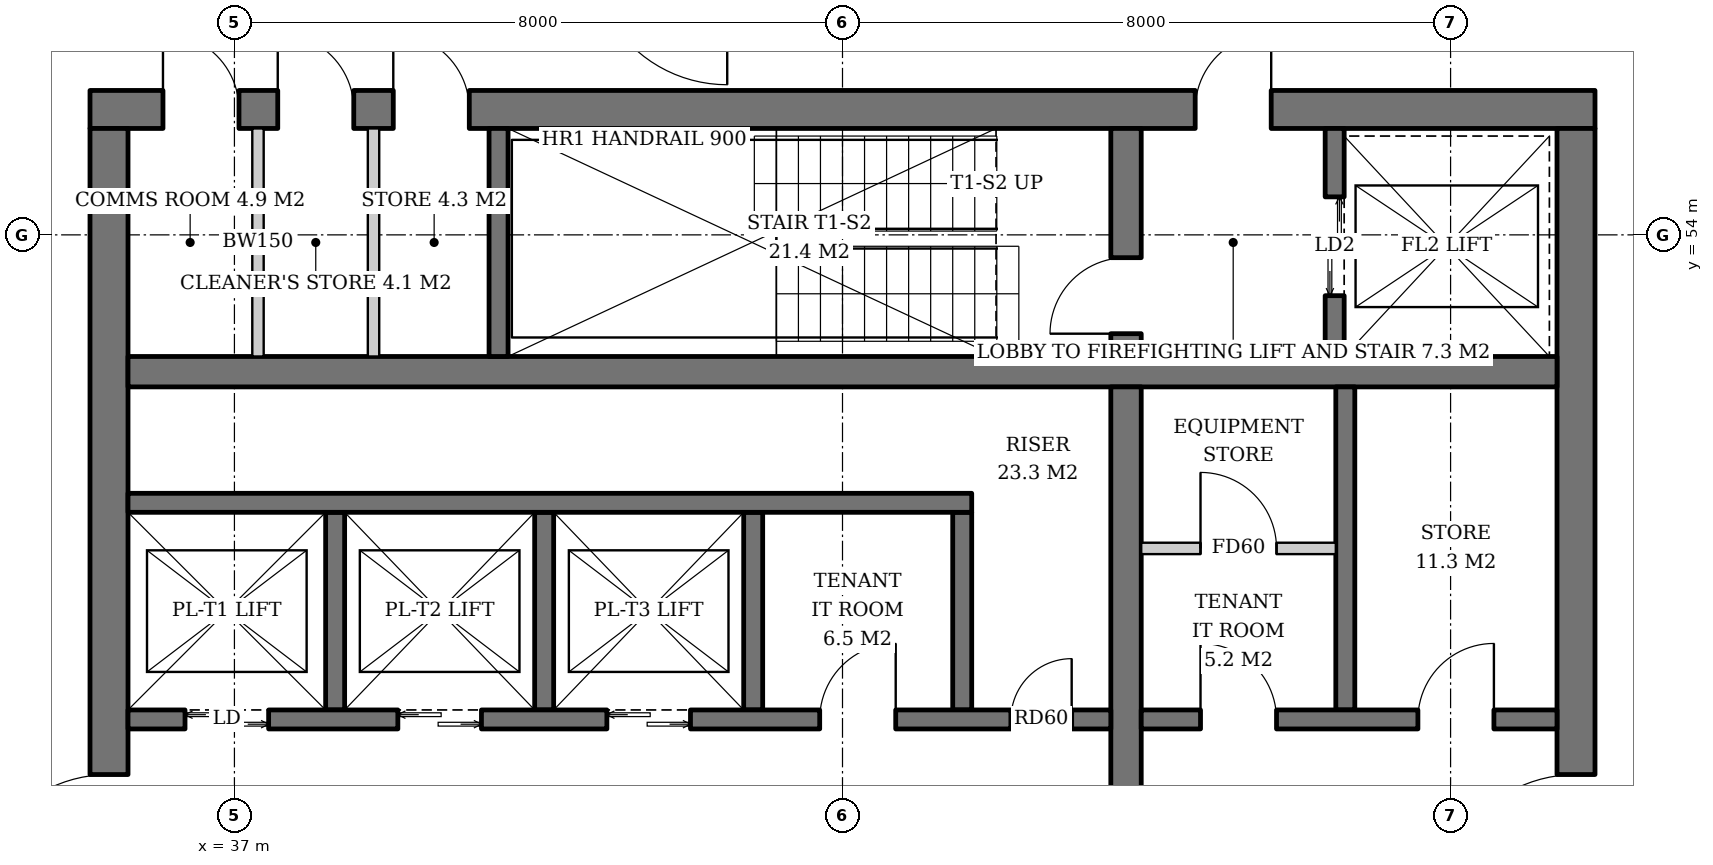
"""IFC4 building model, lengths in metres.
Left out: names, types, materials, properties, quantities, classifications, styles, units other than length and angle.
Written with IfcOpenShell. Run it as: python <this file> out.ifc"""

import sys

from ifc_helpers import new_model, si_unit, direction, frame, frame_2d, origin, place, context, subcontext, project, spatial, rectangle, extrude, element, fill, save


model = new_model("IFC4")
c1 = context("Model", 3, precision=1e-05, world=origin(), true_north=direction((0.0, 1.0)))
c2 = subcontext(c1, "Body", "Model", "MODEL_VIEW")
j1 = project(units=[si_unit("LENGTHUNIT", "METRE"), si_unit("PLANEANGLEUNIT", "RADIAN")], contexts=[c1])
p1 = place(None, origin())
s1 = spatial("IfcSite", under=j1, at=p1, CompositionType="ELEMENT")
p2 = place(p1, origin())
s2 = spatial("IfcBuilding", under=s1, at=p2, CompositionType="ELEMENT")
p3 = place(p2, frame((0.0, 0.0, 256.6)))
s3 = spatial("IfcBuildingStorey", under=s2, at=p3, CompositionType="ELEMENT", Elevation=256.6)
p4 = place(p3, frame((35.1, 55.65, 0.0), z_axis=(0.0, 0.0, 1.0), x_axis=(1.0, 0.0, 0.0)))
e1 = element("IfcWall", 1, at=p4, inside=s3, PredefinedType="SHEAR", context=c2, shape_type="SweptSolid", body=[
    extrude(rectangle(XDim=19.8, YDim=0.5, at=frame_2d((9.9, 0.0))), origin(), (0.0, 0.0, 1.0), 3.8),
])
p5 = place(p4, frame((14.54, 0.0, 0.0)))
e2 = element("IfcOpeningElement", 2, at=p5, cuts=e1, PredefinedType="OPENING", context=c2, shape_type="SweptSolid", body=[
    extrude(rectangle(XDim=1.0, YDim=2.1, at=frame_2d((0.5, 1.05))), frame((0.0, 0.26, 0.0), z_axis=(0.0, -1.0, 0.0), x_axis=(1.0, 0.0, 0.0)), (0.0, 0.0, 1.0), 0.52),
])
p6 = place(p4, frame((0.96, 0.0, 0.0)))
e3 = element("IfcOpeningElement", 3, at=p6, cuts=e1, PredefinedType="OPENING", context=c2, shape_type="SweptSolid", body=[
    extrude(rectangle(XDim=1.0, YDim=2.1, at=frame_2d((0.5, 1.05))), frame((0.0, 0.26, 0.0), z_axis=(0.0, -1.0, 0.0), x_axis=(1.0, 0.0, 0.0)), (0.0, 0.0, 1.0), 0.52),
])
p7 = place(p4, frame((2.47, 0.0, 0.0)))
e4 = element("IfcOpeningElement", 4, at=p7, cuts=e1, PredefinedType="OPENING", context=c2, shape_type="SweptSolid", body=[
    extrude(rectangle(XDim=1.0, YDim=2.1, at=frame_2d((0.5, 1.05))), frame((0.0, 0.26, 0.0), z_axis=(0.0, -1.0, 0.0), x_axis=(1.0, 0.0, 0.0)), (0.0, 0.0, 1.0), 0.52),
])
p8 = place(p4, frame((3.99, 0.0, 0.0)))
e5 = element("IfcOpeningElement", 5, at=p8, cuts=e1, PredefinedType="OPENING", context=c2, shape_type="SweptSolid", body=[
    extrude(rectangle(XDim=1.0, YDim=2.1, at=frame_2d((0.5, 1.05))), frame((0.0, 0.26, 0.0), z_axis=(0.0, -1.0, 0.0), x_axis=(1.0, 0.0, 0.0)), (0.0, 0.0, 1.0), 0.52),
])
p9 = place(p3, frame((35.35, 36.6, 0.0), z_axis=(0.0, 0.0, 1.0), x_axis=(0.0, 1.0, 0.0)))
e6 = element("IfcWall", 6, at=p9, inside=s3, PredefinedType="SHEAR", context=c2, shape_type="SweptSolid", body=[
    extrude(rectangle(XDim=18.8, YDim=0.5, at=frame_2d((9.4, 0.0))), origin(), (0.0, 0.0, 1.0), 3.8),
])
p10 = place(p9, frame((8.5, 0.0, 0.0)))
e7 = element("IfcOpeningElement", 7, at=p10, cuts=e6, PredefinedType="OPENING", context=c2, shape_type="SweptSolid", body=[
    extrude(rectangle(XDim=1.8, YDim=2.4, at=frame_2d((0.9, 1.2))), frame((0.0, 0.26, 0.0), z_axis=(0.0, -1.0, 0.0), x_axis=(1.0, 0.0, 0.0)), (0.0, 0.0, 1.0), 0.52),
])
p11 = place(p3, frame((54.65, 36.6, 0.0), z_axis=(0.0, 0.0, 1.0), x_axis=(0.0, 1.0, 0.0)))
e8 = element("IfcWall", 8, at=p11, inside=s3, PredefinedType="SHEAR", context=c2, shape_type="SweptSolid", body=[
    extrude(rectangle(XDim=18.8, YDim=0.5, at=frame_2d((9.4, 0.0))), origin(), (0.0, 0.0, 1.0), 3.8),
])
p12 = place(p11, frame((8.5, 0.0, 0.0)))
e9 = element("IfcOpeningElement", 9, at=p12, cuts=e8, PredefinedType="OPENING", context=c2, shape_type="SweptSolid", body=[
    extrude(rectangle(XDim=1.8, YDim=2.4, at=frame_2d((0.9, 1.2))), frame((0.0, 0.26, 0.0), z_axis=(0.0, -1.0, 0.0), x_axis=(1.0, 0.0, 0.0)), (0.0, 0.0, 1.0), 0.52),
])
p13 = place(p3, frame((35.6, 52.2, 0.0), z_axis=(0.0, 0.0, 1.0), x_axis=(1.0, 0.0, 0.0)))
e10 = element("IfcWall", 10, at=p13, inside=s3, PredefinedType="SHEAR", context=c2, shape_type="SweptSolid", body=[
    extrude(rectangle(XDim=18.8, YDim=0.4, at=frame_2d((9.4, 0.0))), origin(), (0.0, 0.0, 1.0), 3.8),
])
p14 = place(p3, frame((48.73, 40.0, 0.0), z_axis=(0.0, 0.0, 1.0), x_axis=(0.0, 1.0, 0.0)))
e11 = element("IfcWall", 11, at=p14, inside=s3, PredefinedType="SHEAR", context=c2, shape_type="SweptSolid", body=[
    extrude(rectangle(XDim=12.0, YDim=0.4, at=frame_2d((6.0, 0.0))), origin(), (0.0, 0.0, 1.0), 3.8),
])
p15 = place(p3, frame((48.73, 52.4, 0.0), z_axis=(0.0, 0.0, 1.0), x_axis=(0.0, 1.0, 0.0)))
e12 = element("IfcWall", 12, at=p15, inside=s3, PredefinedType="SHEAR", context=c2, shape_type="SweptSolid", body=[
    extrude(rectangle(XDim=3.0, YDim=0.4, at=frame_2d((1.5, 0.0))), origin(), (0.0, 0.0, 1.0), 3.8),
])
p16 = place(p15, frame((0.3, 0.0, 0.0)))
e13 = element("IfcOpeningElement", 13, at=p16, cuts=e12, PredefinedType="OPENING", context=c2, shape_type="SweptSolid", body=[
    extrude(rectangle(XDim=1.0, YDim=2.1, at=frame_2d((0.5, 1.05))), frame((0.0, 0.21, 0.0), z_axis=(0.0, -1.0, 0.0), x_axis=(1.0, 0.0, 0.0)), (0.0, 0.0, 1.0), 0.42),
])
p17 = place(p3, frame((40.475, 52.4, 0.0), z_axis=(0.0, 0.0, 1.0), x_axis=(0.0, 1.0, 0.0)))
e14 = element("IfcWall", 14, at=p17, inside=s3, PredefinedType="SHEAR", context=c2, shape_type="SweptSolid", body=[
    extrude(rectangle(XDim=3.0, YDim=0.25, at=frame_2d((1.5, 0.0))), origin(), (0.0, 0.0, 1.0), 3.8),
])
p18 = place(p3, frame((51.475, 52.4, 0.0), z_axis=(0.0, 0.0, 1.0), x_axis=(0.0, 1.0, 0.0)))
e15 = element("IfcWall", 15, at=p18, inside=s3, PredefinedType="SHEAR", context=c2, shape_type="SweptSolid", body=[
    extrude(rectangle(XDim=3.0, YDim=0.25, at=frame_2d((1.5, 0.0))), origin(), (0.0, 0.0, 1.0), 3.8),
])
p19 = place(p18, frame((0.8, 0.0, 0.0)))
e16 = element("IfcOpeningElement", 16, at=p19, cuts=e15, PredefinedType="OPENING", context=c2, shape_type="SweptSolid", body=[
    extrude(rectangle(XDim=1.3, YDim=2.2, at=frame_2d((0.65, 1.1))), frame((0.0, 0.135, 0.0), z_axis=(0.0, -1.0, 0.0), x_axis=(1.0, 0.0, 0.0)), (0.0, 0.0, 1.0), 0.27),
])
for number, where, z_axis, x_axis in (
    (17, (38.325, 47.75, 0.0), (0.0, 0.0, 1.0), (0.0, 1.0, 0.0)),
    (18, (41.075, 47.75, 0.0), (0.0, 0.0, 1.0), (0.0, 1.0, 0.0)),
    (19, (43.825, 47.75, 0.0), (0.0, 0.0, 1.0), (0.0, 1.0, 0.0)),
    (20, (46.575, 47.75, 0.0), (0.0, 0.0, 1.0), (0.0, 1.0, 0.0)),
):
    element("IfcWall", number, at=place(p3, frame(where, z_axis=z_axis, x_axis=x_axis)), inside=s3, PredefinedType="SHEAR", context=c2, shape_type="SweptSolid", body=[
        extrude(rectangle(XDim=2.6, YDim=0.25, at=frame_2d((1.3, 0.0))), origin(), (0.0, 0.0, 1.0), 3.8),
    ])
p20 = place(p3, frame((35.6, 50.475, 0.0), z_axis=(0.0, 0.0, 1.0), x_axis=(1.0, 0.0, 0.0)))
e21 = element("IfcWall", 21, at=p20, inside=s3, PredefinedType="SHEAR", context=c2, shape_type="SweptSolid", body=[
    extrude(rectangle(XDim=11.1, YDim=0.25, at=frame_2d((5.55, 0.0))), origin(), (0.0, 0.0, 1.0), 3.8),
])
p21 = place(p3, frame((35.6, 47.625, 0.0), z_axis=(0.0, 0.0, 1.0), x_axis=(1.0, 0.0, 0.0)))
e22 = element("IfcWall", 22, at=p21, inside=s3, PredefinedType="SHEAR", context=c2, shape_type="SweptSolid", body=[
    extrude(rectangle(XDim=12.93, YDim=0.25, at=frame_2d((6.465, 0.0))), origin(), (0.0, 0.0, 1.0), 3.8),
])
p22 = place(p21, frame((0.75, 0.0, 0.0)))
e23 = element("IfcOpeningElement", 23, at=p22, cuts=e22, PredefinedType="OPENING", context=c2, shape_type="SweptSolid", body=[
    extrude(rectangle(XDim=1.1, YDim=2.2, at=frame_2d((0.55, 1.1))), frame((0.0, 0.135, 0.0), z_axis=(0.0, -1.0, 0.0), x_axis=(1.0, 0.0, 0.0)), (0.0, 0.0, 1.0), 0.27),
])
p23 = place(p21, frame((3.55, 0.0, 0.0)))
e24 = element("IfcOpeningElement", 24, at=p23, cuts=e22, PredefinedType="OPENING", context=c2, shape_type="SweptSolid", body=[
    extrude(rectangle(XDim=1.1, YDim=2.2, at=frame_2d((0.55, 1.1))), frame((0.0, 0.135, 0.0), z_axis=(0.0, -1.0, 0.0), x_axis=(1.0, 0.0, 0.0)), (0.0, 0.0, 1.0), 0.27),
])
p24 = place(p21, frame((6.3, 0.0, 0.0)))
e25 = element("IfcOpeningElement", 25, at=p24, cuts=e22, PredefinedType="OPENING", context=c2, shape_type="SweptSolid", body=[
    extrude(rectangle(XDim=1.1, YDim=2.2, at=frame_2d((0.55, 1.1))), frame((0.0, 0.135, 0.0), z_axis=(0.0, -1.0, 0.0), x_axis=(1.0, 0.0, 0.0)), (0.0, 0.0, 1.0), 0.27),
])
p25 = place(p21, frame((9.1, 0.0, 0.0)))
e26 = element("IfcOpeningElement", 26, at=p25, cuts=e22, PredefinedType="OPENING", context=c2, shape_type="SweptSolid", body=[
    extrude(rectangle(XDim=1.0, YDim=2.1, at=frame_2d((0.5, 1.05))), frame((0.0, 0.135, 0.0), z_axis=(0.0, -1.0, 0.0), x_axis=(1.0, 0.0, 0.0)), (0.0, 0.0, 1.0), 0.27),
])
p26 = place(p21, frame((11.615, 0.0, 0.0)))
e27 = element("IfcOpeningElement", 27, at=p26, cuts=e22, PredefinedType="OPENING", context=c2, shape_type="SweptSolid", body=[
    extrude(rectangle(XDim=0.8, YDim=2.0, at=frame_2d((0.4, 1.0))), frame((0.0, 0.135, 0.0), z_axis=(0.0, -1.0, 0.0), x_axis=(1.0, 0.0, 0.0)), (0.0, 0.0, 1.0), 0.27),
])
p27 = place(p3, frame((51.615, 47.75, 0.0), z_axis=(0.0, 0.0, 1.0), x_axis=(0.0, 1.0, 0.0)))
e28 = element("IfcWall", 28, at=p27, inside=s3, PredefinedType="SHEAR", context=c2, shape_type="SweptSolid", body=[
    extrude(rectangle(XDim=4.25, YDim=0.25, at=frame_2d((2.125, 0.0))), origin(), (0.0, 0.0, 1.0), 3.8),
])
p28 = place(p3, frame((48.93, 47.625, 0.0), z_axis=(0.0, 0.0, 1.0), x_axis=(1.0, 0.0, 0.0)))
e29 = element("IfcWall", 29, at=p28, inside=s3, PredefinedType="SHEAR", context=c2, shape_type="SweptSolid", body=[
    extrude(rectangle(XDim=5.47, YDim=0.25, at=frame_2d((2.735, 0.0))), origin(), (0.0, 0.0, 1.0), 3.8),
])
p29 = place(p28, frame((0.78, 0.0, 0.0)))
e30 = element("IfcOpeningElement", 30, at=p29, cuts=e29, PredefinedType="OPENING", context=c2, shape_type="SweptSolid", body=[
    extrude(rectangle(XDim=1.0, YDim=2.1, at=frame_2d((0.5, 1.05))), frame((0.0, 0.135, 0.0), z_axis=(0.0, -1.0, 0.0), x_axis=(1.0, 0.0, 0.0)), (0.0, 0.0, 1.0), 0.27),
])
p30 = place(p28, frame((3.64, 0.0, 0.0)))
e31 = element("IfcOpeningElement", 31, at=p30, cuts=e29, PredefinedType="OPENING", context=c2, shape_type="SweptSolid", body=[
    extrude(rectangle(XDim=1.0, YDim=2.1, at=frame_2d((0.5, 1.05))), frame((0.0, 0.135, 0.0), z_axis=(0.0, -1.0, 0.0), x_axis=(1.0, 0.0, 0.0)), (0.0, 0.0, 1.0), 0.27),
])
for number, where, z_axis, x_axis in (
    (32, (37.31, 52.4, 0.0), (0.0, 0.0, 1.0), (0.0, 1.0, 0.0)),
    (33, (38.83, 52.4, 0.0), (0.0, 0.0, 1.0), (0.0, 1.0, 0.0)),
):
    element("IfcWall", number, at=place(p3, frame(where, z_axis=z_axis, x_axis=x_axis)), inside=s3, PredefinedType="SOLIDWALL", context=c2, shape_type="SweptSolid", body=[
        extrude(rectangle(XDim=3.0, YDim=0.15, at=frame_2d((1.5, 0.0))), origin(), (0.0, 0.0, 1.0), 3.62),
    ])
p31 = place(p3, frame((48.93, 49.875, 0.0), z_axis=(0.0, 0.0, 1.0), x_axis=(1.0, 0.0, 0.0)))
e34 = element("IfcWall", 34, at=p31, inside=s3, PredefinedType="SOLIDWALL", context=c2, shape_type="SweptSolid", body=[
    extrude(rectangle(XDim=2.56, YDim=0.15, at=frame_2d((1.28, 0.0))), origin(), (0.0, 0.0, 1.0), 3.62),
])
p32 = place(p31, frame((0.78, 0.0, 0.0)))
e35 = element("IfcOpeningElement", 35, at=p32, cuts=e34, PredefinedType="OPENING", context=c2, shape_type="SweptSolid", body=[
    extrude(rectangle(XDim=1.0, YDim=2.1, at=frame_2d((0.5, 1.05))), frame((0.0, 0.085, 0.0), z_axis=(0.0, -1.0, 0.0), x_axis=(1.0, 0.0, 0.0)), (0.0, 0.0, 1.0), 0.17),
])
p33 = place(p19, origin())
e36 = element("IfcDoor", 36, at=p33, inside=s3, OperationType="DOUBLE_DOOR_SLIDING", PredefinedType="DOOR", context=c2, shape_type="SweptSolid", body=[
    extrude(rectangle(XDim=1.3, YDim=2.2, at=frame_2d((0.65, 1.1))), frame((0.0, 0.025, 0.0), z_axis=(0.0, -1.0, 0.0), x_axis=(1.0, 0.0, 0.0)), (0.0, 0.0, 1.0), 0.05),
])
fill(e16, e36)
p34 = place(p22, origin())
e37 = element("IfcDoor", 37, at=p34, inside=s3, OperationType="DOUBLE_DOOR_SLIDING", PredefinedType="DOOR", context=c2, shape_type="SweptSolid", body=[
    extrude(rectangle(XDim=1.1, YDim=2.2, at=frame_2d((0.55, 1.1))), frame((0.0, 0.025, 0.0), z_axis=(0.0, -1.0, 0.0), x_axis=(1.0, 0.0, 0.0)), (0.0, 0.0, 1.0), 0.05),
])
fill(e23, e37)
p35 = place(p23, origin())
e38 = element("IfcDoor", 38, at=p35, inside=s3, OperationType="DOUBLE_DOOR_SLIDING", PredefinedType="DOOR", context=c2, shape_type="SweptSolid", body=[
    extrude(rectangle(XDim=1.1, YDim=2.2, at=frame_2d((0.55, 1.1))), frame((0.0, 0.025, 0.0), z_axis=(0.0, -1.0, 0.0), x_axis=(1.0, 0.0, 0.0)), (0.0, 0.0, 1.0), 0.05),
])
fill(e24, e38)
p36 = place(p24, origin())
e39 = element("IfcDoor", 39, at=p36, inside=s3, OperationType="DOUBLE_DOOR_SLIDING", PredefinedType="DOOR", context=c2, shape_type="SweptSolid", body=[
    extrude(rectangle(XDim=1.1, YDim=2.2, at=frame_2d((0.55, 1.1))), frame((0.0, 0.025, 0.0), z_axis=(0.0, -1.0, 0.0), x_axis=(1.0, 0.0, 0.0)), (0.0, 0.0, 1.0), 0.05),
])
fill(e25, e39)
p37 = place(p25, origin())
e40 = element("IfcDoor", 40, at=p37, inside=s3, OperationType="SINGLE_SWING_RIGHT", PredefinedType="DOOR", context=c2, shape_type="SweptSolid", body=[
    extrude(rectangle(XDim=1.0, YDim=2.1, at=frame_2d((0.5, 1.05))), frame((0.0, 0.025, 0.0), z_axis=(0.0, -1.0, 0.0), x_axis=(1.0, 0.0, 0.0)), (0.0, 0.0, 1.0), 0.05),
])
fill(e26, e40)
p38 = place(p26, origin())
e41 = element("IfcDoor", 41, at=p38, inside=s3, OperationType="SINGLE_SWING_RIGHT", PredefinedType="DOOR", context=c2, shape_type="SweptSolid", body=[
    extrude(rectangle(XDim=0.8, YDim=2.0, at=frame_2d((0.4, 1.0))), frame((0.0, 0.025, 0.0), z_axis=(0.0, -1.0, 0.0), x_axis=(1.0, 0.0, 0.0)), (0.0, 0.0, 1.0), 0.05),
])
fill(e27, e41)
p39 = place(p29, origin())
e42 = element("IfcDoor", 42, at=p39, inside=s3, OperationType="SINGLE_SWING_LEFT", PredefinedType="DOOR", context=c2, shape_type="SweptSolid", body=[
    extrude(rectangle(XDim=1.0, YDim=2.1, at=frame_2d((0.5, 1.05))), frame((0.0, 0.025, 0.0), z_axis=(0.0, -1.0, 0.0), x_axis=(1.0, 0.0, 0.0)), (0.0, 0.0, 1.0), 0.05),
])
fill(e30, e42)
p40 = place(p30, origin())
e43 = element("IfcDoor", 43, at=p40, inside=s3, OperationType="SINGLE_SWING_RIGHT", PredefinedType="DOOR", context=c2, shape_type="SweptSolid", body=[
    extrude(rectangle(XDim=1.0, YDim=2.1, at=frame_2d((0.5, 1.05))), frame((0.0, 0.025, 0.0), z_axis=(0.0, -1.0, 0.0), x_axis=(1.0, 0.0, 0.0)), (0.0, 0.0, 1.0), 0.05),
])
fill(e31, e43)
p41 = place(p32, origin())
e44 = element("IfcDoor", 44, at=p41, inside=s3, OperationType="SINGLE_SWING_LEFT", PredefinedType="DOOR", context=c2, shape_type="SweptSolid", body=[
    extrude(rectangle(XDim=1.0, YDim=2.1, at=frame_2d((0.5, 1.05))), frame((0.0, 0.025, 0.0), z_axis=(0.0, -1.0, 0.0), x_axis=(1.0, 0.0, 0.0)), (0.0, 0.0, 1.0), 0.05),
])
fill(e35, e44)
p42 = place(p16, origin())
e45 = element("IfcDoor", 45, at=p42, inside=s3, OperationType="SINGLE_SWING_LEFT", PredefinedType="DOOR", context=c2, shape_type="SweptSolid", body=[
    extrude(rectangle(XDim=1.0, YDim=2.1, at=frame_2d((0.5, 1.05))), frame((0.0, 0.025, 0.0), z_axis=(0.0, -1.0, 0.0), x_axis=(1.0, 0.0, 0.0)), (0.0, 0.0, 1.0), 0.05),
])
fill(e13, e45)
p43 = place(p5, origin())
e46 = element("IfcDoor", 46, at=p43, inside=s3, OperationType="SINGLE_SWING_RIGHT", PredefinedType="DOOR", context=c2, shape_type="SweptSolid", body=[
    extrude(rectangle(XDim=1.0, YDim=2.1, at=frame_2d((0.5, 1.05))), frame((0.0, 0.025, 0.0), z_axis=(0.0, -1.0, 0.0), x_axis=(1.0, 0.0, 0.0)), (0.0, 0.0, 1.0), 0.05),
])
fill(e2, e46)
p44 = place(p10, origin())
e47 = element("IfcDoor", 47, at=p44, inside=s3, OperationType="DOUBLE_DOOR_SINGLE_SWING", PredefinedType="DOOR", context=c2, shape_type="SweptSolid", body=[
    extrude(rectangle(XDim=1.8, YDim=2.4, at=frame_2d((0.9, 1.2))), frame((0.0, 0.025, 0.0), z_axis=(0.0, -1.0, 0.0), x_axis=(1.0, 0.0, 0.0)), (0.0, 0.0, 1.0), 0.05),
])
fill(e7, e47)
p45 = place(p12, origin())
e48 = element("IfcDoor", 48, at=p45, inside=s3, OperationType="DOUBLE_DOOR_SINGLE_SWING", PredefinedType="DOOR", context=c2, shape_type="SweptSolid", body=[
    extrude(rectangle(XDim=1.8, YDim=2.4, at=frame_2d((0.9, 1.2))), frame((0.0, 0.025, 0.0), z_axis=(0.0, -1.0, 0.0), x_axis=(1.0, 0.0, 0.0)), (0.0, 0.0, 1.0), 0.05),
])
fill(e9, e48)
p46 = place(p6, origin())
e49 = element("IfcDoor", 49, at=p46, inside=s3, OperationType="SINGLE_SWING_LEFT", PredefinedType="DOOR", context=c2, shape_type="SweptSolid", body=[
    extrude(rectangle(XDim=1.0, YDim=2.1, at=frame_2d((0.5, 1.05))), frame((0.0, -0.19, 0.0), z_axis=(0.0, -1.0, 0.0), x_axis=(1.0, 0.0, 0.0)), (0.0, 0.0, 1.0), 0.05),
])
fill(e3, e49)
p47 = place(p7, origin())
e50 = element("IfcDoor", 50, at=p47, inside=s3, OperationType="SINGLE_SWING_LEFT", PredefinedType="DOOR", context=c2, shape_type="SweptSolid", body=[
    extrude(rectangle(XDim=1.0, YDim=2.1, at=frame_2d((0.5, 1.05))), frame((0.0, -0.19, 0.0), z_axis=(0.0, -1.0, 0.0), x_axis=(1.0, 0.0, 0.0)), (0.0, 0.0, 1.0), 0.05),
])
fill(e4, e50)
p48 = place(p8, origin())
e51 = element("IfcDoor", 51, at=p48, inside=s3, OperationType="SINGLE_SWING_LEFT", PredefinedType="DOOR", context=c2, shape_type="SweptSolid", body=[
    extrude(rectangle(XDim=1.0, YDim=2.1, at=frame_2d((0.5, 1.05))), frame((0.0, -0.19, 0.0), z_axis=(0.0, -1.0, 0.0), x_axis=(1.0, 0.0, 0.0)), (0.0, 0.0, 1.0), 0.05),
])
fill(e5, e51)
save(model, sys.argv[1])
